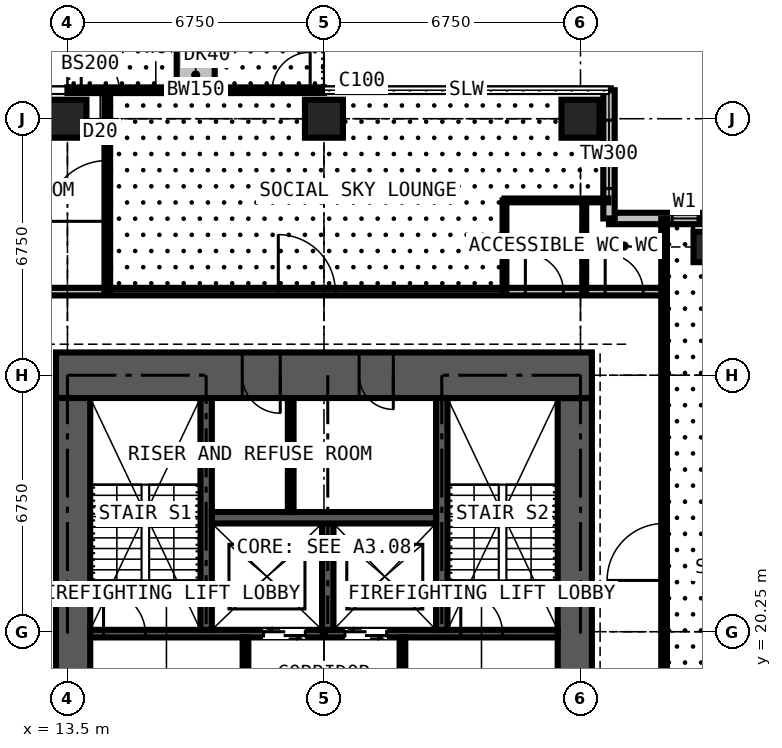
"""IFC4 building model, lengths in metres.
Left out: names, types, materials, properties, quantities, classifications, styles, units other than length and angle.
Written with IfcOpenShell. Run it as: python <this file> out.ifc"""

import sys

from ifc_helpers import new_model, si_unit, direction, frame, frame_2d, origin, origin_2d, place, context, subcontext, project, spatial, rectangle, extrude, element, fill, save


model = new_model("IFC4")
c1 = context("Model", 3, precision=1e-05, world=origin(), true_north=direction((0.0, 1.0)))
c2 = subcontext(c1, "Body", "Model", "MODEL_VIEW")
j1 = project(units=[si_unit("LENGTHUNIT", "METRE"), si_unit("PLANEANGLEUNIT", "RADIAN")], contexts=[c1])
p1 = place(None, origin())
s1 = spatial("IfcSite", under=j1, at=p1, CompositionType="ELEMENT")
p2 = place(p1, origin())
s2 = spatial("IfcBuilding", under=s1, at=p2, CompositionType="ELEMENT")
p3 = place(p2, frame((0.0, 0.0, 251.1)))
s3 = spatial("IfcBuildingStorey", under=s2, at=p3, CompositionType="ELEMENT", Elevation=251.1)
for number, where, z_axis, x_axis in (
    (1, (13.5, 33.75, 0.0), (0.0, 0.0, 1.0), (1.0, 0.0, 0.0)),
    (2, (20.25, 33.75, 0.0), (0.0, 0.0, 1.0), (1.0, 0.0, 0.0)),
    (3, (27.0, 33.75, 0.0), (0.0, 0.0, 1.0), (1.0, 0.0, 0.0)),
):
    element("IfcColumn", number, at=place(p3, frame(where, z_axis=z_axis, x_axis=x_axis)), inside=s3, PredefinedType="COLUMN", context=c2, shape_type="SweptSolid", body=[
        extrude(rectangle(XDim=1.0, YDim=1.0, at=origin_2d()), origin(), (0.0, 0.0, 1.0), 3.6),
    ])
p4 = place(p3, frame((30.375, 30.375, 0.0), z_axis=(0.0, 0.0, 1.0), x_axis=(1.0, 0.0, 0.0)))
e4 = element("IfcColumn", 4, at=p4, inside=s3, PredefinedType="COLUMN", context=c2, shape_type="SweptSolid", body=[
    extrude(rectangle(XDim=0.8, YDim=0.8, at=origin_2d()), origin(), (0.0, 0.0, 1.0), 3.6),
])
p5 = place(p3, frame((26.85, 14.1, 0.0), z_axis=(0.0, 0.0, 1.0), x_axis=(0.0, 1.0, 0.0)))
e5 = element("IfcWall", 5, at=p5, inside=s3, PredefinedType="SHEAR", context=c2, shape_type="SweptSolid", body=[
    extrude(rectangle(XDim=12.3, YDim=0.9, at=frame_2d((6.15, 0.0))), origin(), (0.0, 0.0, 1.0), 3.6),
])
p6 = place(p5, frame((3.65, 0.0, 0.0)))
e6 = element("IfcOpeningElement", 6, at=p6, cuts=e5, PredefinedType="OPENING", context=c2, shape_type="SweptSolid", body=[
    extrude(rectangle(XDim=1.2, YDim=2.2, at=frame_2d((0.6, 1.1))), frame((0.0, 0.46, 0.0), z_axis=(0.0, -1.0, 0.0), x_axis=(1.0, 0.0, 0.0)), (0.0, 0.0, 1.0), 0.92),
])
p7 = place(p3, frame((27.3, 27.0, 0.0), z_axis=(0.0, 0.0, 1.0), x_axis=(-1.0, 0.0, 0.0)))
e7 = element("IfcWall", 7, at=p7, inside=s3, PredefinedType="SHEAR", context=c2, shape_type="SweptSolid", body=[
    extrude(rectangle(XDim=14.1, YDim=1.2, at=frame_2d((7.05, 0.0))), origin(), (0.0, 0.0, 1.0), 3.6),
])
p8 = place(p7, frame((5.225, 0.0, 0.0)))
e8 = element("IfcOpeningElement", 8, at=p8, cuts=e7, PredefinedType="OPENING", context=c2, shape_type="SweptSolid", body=[
    extrude(rectangle(XDim=0.9, YDim=2.2, at=frame_2d((0.45, 1.1))), frame((0.0, 0.61, 0.0), z_axis=(0.0, -1.0, 0.0), x_axis=(1.0, 0.0, 0.0)), (0.0, 0.0, 1.0), 1.22),
])
p9 = place(p7, frame((8.2, 0.0, 0.0)))
e9 = element("IfcOpeningElement", 9, at=p9, cuts=e7, PredefinedType="OPENING", context=c2, shape_type="SweptSolid", body=[
    extrude(rectangle(XDim=1.0, YDim=2.2, at=frame_2d((0.5, 1.1))), frame((0.0, 0.61, 0.0), z_axis=(0.0, -1.0, 0.0), x_axis=(1.0, 0.0, 0.0)), (0.0, 0.0, 1.0), 1.22),
])
p10 = place(p3, frame((13.65, 26.4, 0.0), z_axis=(0.0, 0.0, 1.0), x_axis=(0.0, -1.0, 0.0)))
e10 = element("IfcWall", 10, at=p10, inside=s3, PredefinedType="SHEAR", context=c2, shape_type="SweptSolid", body=[
    extrude(rectangle(XDim=12.3, YDim=0.9, at=frame_2d((6.15, 0.0))), origin(), (0.0, 0.0, 1.0), 3.6),
])
p11 = place(p10, frame((7.45, 0.0, 0.0)))
e11 = element("IfcOpeningElement", 11, at=p11, cuts=e10, PredefinedType="OPENING", context=c2, shape_type="SweptSolid", body=[
    extrude(rectangle(XDim=1.2, YDim=2.2, at=frame_2d((0.6, 1.1))), frame((0.0, 0.46, 0.0), z_axis=(0.0, -1.0, 0.0), x_axis=(1.0, 0.0, 0.0)), (0.0, 0.0, 1.0), 0.92),
])
p12 = place(p3, frame((31.125, 31.125, 0.0), z_axis=(0.0, 0.0, 1.0), x_axis=(-1.0, 0.0, 0.0)))
e12 = element("IfcWall", 12, at=p12, inside=s3, PredefinedType="SOLIDWALL", context=c2, shape_type="SweptSolid", body=[
    extrude(rectangle(XDim=3.375, YDim=0.3, at=frame_2d((1.688, 0.0))), origin(), (0.0, 0.0, 1.0), 3.3),
])
p13 = place(p12, frame((0.212, 0.0, 0.9)))
e13 = element("IfcOpeningElement", 13, at=p13, cuts=e12, PredefinedType="OPENING", context=c2, shape_type="SweptSolid", body=[
    extrude(rectangle(XDim=1.5, YDim=1.8, at=frame_2d((0.75, 0.9))), frame((0.0, 0.16, 0.0), z_axis=(0.0, -1.0, 0.0), x_axis=(1.0, 0.0, 0.0)), (0.0, 0.0, 1.0), 0.32),
])
p14 = place(p3, frame((27.75, 31.125, 0.0), z_axis=(0.0, 0.0, 1.0), x_axis=(0.0, 1.0, 0.0)))
e14 = element("IfcWall", 14, at=p14, inside=s3, PredefinedType="SOLIDWALL", context=c2, shape_type="SweptSolid", body=[
    extrude(rectangle(XDim=3.375, YDim=0.3, at=frame_2d((1.688, 0.0))), origin(), (0.0, 0.0, 1.0), 3.3),
])
p15 = place(p14, frame((0.788, 0.0, 0.6)))
e15 = element("IfcOpeningElement", 15, at=p15, cuts=e14, PredefinedType="OPENING", context=c2, shape_type="SweptSolid", body=[
    extrude(rectangle(XDim=1.8, YDim=2.1, at=frame_2d((0.9, 1.05))), frame((0.0, 0.16, 0.0), z_axis=(0.0, -1.0, 0.0), x_axis=(1.0, 0.0, 0.0)), (0.0, 0.0, 1.0), 0.32),
])
p16 = place(p3, frame((13.5, 34.5, 0.0), z_axis=(0.0, 0.0, 1.0), x_axis=(1.0, 0.0, 0.0)))
e16 = element("IfcWall", 16, at=p16, inside=s3, PredefinedType="SOLIDWALL", context=c2, shape_type="SweptSolid", body=[
    extrude(rectangle(XDim=6.75, YDim=0.15, at=frame_2d((3.375, 0.0))), origin(), (0.0, 0.0, 1.0), 3.3),
])
p17 = place(p16, frame((0.363, 0.0, 0.0)))
e17 = element("IfcOpeningElement", 17, at=p17, cuts=e16, PredefinedType="OPENING", context=c2, shape_type="SweptSolid", body=[
    extrude(rectangle(XDim=1.0, YDim=2.2, at=frame_2d((0.5, 1.1))), frame((0.0, 0.085, 0.0), z_axis=(0.0, -1.0, 0.0), x_axis=(1.0, 0.0, 0.0)), (0.0, 0.0, 1.0), 0.17),
])
p18 = place(p16, frame((1.725, 0.0, 0.9)))
e18 = element("IfcOpeningElement", 18, at=p18, cuts=e16, PredefinedType="OPENING", context=c2, shape_type="SweptSolid", body=[
    extrude(rectangle(XDim=1.2, YDim=1.8, at=frame_2d((0.6, 0.9))), frame((0.0, 0.085, 0.0), z_axis=(0.0, -1.0, 0.0), x_axis=(1.0, 0.0, 0.0)), (0.0, 0.0, 1.0), 0.17),
])
p19 = place(p16, frame((5.387, 0.0, 0.0)))
e19 = element("IfcOpeningElement", 19, at=p19, cuts=e16, PredefinedType="OPENING", context=c2, shape_type="SweptSolid", body=[
    extrude(rectangle(XDim=1.0, YDim=2.2, at=frame_2d((0.5, 1.1))), frame((0.0, 0.085, 0.0), z_axis=(0.0, -1.0, 0.0), x_axis=(1.0, 0.0, 0.0)), (0.0, 0.0, 1.0), 0.17),
])
p20 = place(p16, frame((3.825, 0.0, 0.9)))
e20 = element("IfcOpeningElement", 20, at=p20, cuts=e16, PredefinedType="OPENING", context=c2, shape_type="SweptSolid", body=[
    extrude(rectangle(XDim=1.2, YDim=1.8, at=frame_2d((0.6, 0.9))), frame((0.0, 0.085, 0.0), z_axis=(0.0, -1.0, 0.0), x_axis=(1.0, 0.0, 0.0)), (0.0, 0.0, 1.0), 0.17),
])
p21 = place(p3, frame((16.875, 34.6, 0.0), z_axis=(0.0, 0.0, 1.0), x_axis=(0.0, 1.0, 0.0)))
e21 = element("IfcWall", 21, at=p21, inside=s3, PredefinedType="USERDEFINED", context=c2, shape_type="SweptSolid", body=[
    extrude(rectangle(XDim=2.2, YDim=1.0, at=frame_2d((1.1, 0.0))), origin(), (0.0, 0.0, 1.0), 0.9),
])
p22 = place(p3, frame((14.1, 20.2, 0.0), z_axis=(0.0, 0.0, 1.0), x_axis=(1.0, 0.0, 0.0)))
e22 = element("IfcWall", 22, at=p22, inside=s3, PredefinedType="SHEAR", context=c2, shape_type="SweptSolid", body=[
    extrude(rectangle(XDim=12.3, YDim=0.2, at=frame_2d((6.15, 0.0))), origin(), (0.0, 0.0, 1.0), 3.6),
])
p23 = place(p22, frame((4.56, 0.0, 0.0)))
e23 = element("IfcOpeningElement", 23, at=p23, cuts=e22, PredefinedType="OPENING", context=c2, shape_type="SweptSolid", body=[
    extrude(rectangle(XDim=1.1, YDim=2.2, at=frame_2d((0.55, 1.1))), frame((0.0, 0.11, 0.0), z_axis=(0.0, -1.0, 0.0), x_axis=(1.0, 0.0, 0.0)), (0.0, 0.0, 1.0), 0.22),
])
p24 = place(p22, frame((6.7, 0.0, 0.0)))
e24 = element("IfcOpeningElement", 24, at=p24, cuts=e22, PredefinedType="OPENING", context=c2, shape_type="SweptSolid", body=[
    extrude(rectangle(XDim=1.1, YDim=2.2, at=frame_2d((0.55, 1.1))), frame((0.0, 0.11, 0.0), z_axis=(0.0, -1.0, 0.0), x_axis=(1.0, 0.0, 0.0)), (0.0, 0.0, 1.0), 0.22),
])
p25 = place(p22, frame((0.35, 0.0, 0.0)))
e25 = element("IfcOpeningElement", 25, at=p25, cuts=e22, PredefinedType="OPENING", context=c2, shape_type="SweptSolid", body=[
    extrude(rectangle(XDim=1.1, YDim=2.2, at=frame_2d((0.55, 1.1))), frame((0.0, 0.11, 0.0), z_axis=(0.0, -1.0, 0.0), x_axis=(1.0, 0.0, 0.0)), (0.0, 0.0, 1.0), 0.22),
])
p26 = place(p22, frame((9.75, 0.0, 0.0)))
e26 = element("IfcOpeningElement", 26, at=p26, cuts=e22, PredefinedType="OPENING", context=c2, shape_type="SweptSolid", body=[
    extrude(rectangle(XDim=1.1, YDim=2.2, at=frame_2d((0.55, 1.1))), frame((0.0, 0.11, 0.0), z_axis=(0.0, -1.0, 0.0), x_axis=(1.0, 0.0, 0.0)), (0.0, 0.0, 1.0), 0.22),
])
for number, where, z_axis, x_axis in (
    (27, (17.15, 20.3, 0.0), (0.0, 0.0, 1.0), (0.0, 1.0, 0.0)),
    (28, (23.35, 20.3, 0.0), (0.0, 0.0, 1.0), (0.0, 1.0, 0.0)),
):
    element("IfcWall", number, at=place(p3, frame(where, z_axis=z_axis, x_axis=x_axis)), inside=s3, PredefinedType="SHEAR", context=c2, shape_type="SweptSolid", body=[
        extrude(rectangle(XDim=6.1, YDim=0.3, at=frame_2d((3.05, 0.0))), origin(), (0.0, 0.0, 1.0), 3.6),
    ])
p27 = place(p3, frame((20.35, 20.3, 0.0), z_axis=(0.0, 0.0, 1.0), x_axis=(0.0, 1.0, 0.0)))
e29 = element("IfcWall", 29, at=p27, inside=s3, PredefinedType="SHEAR", context=c2, shape_type="SweptSolid", body=[
    extrude(rectangle(XDim=2.8, YDim=0.3, at=frame_2d((1.4, 0.0))), origin(), (0.0, 0.0, 1.0), 3.6),
])
p28 = place(p3, frame((17.3, 23.25, 0.0), z_axis=(0.0, 0.0, 1.0), x_axis=(1.0, 0.0, 0.0)))
e30 = element("IfcWall", 30, at=p28, inside=s3, PredefinedType="SHEAR", context=c2, shape_type="SweptSolid", body=[
    extrude(rectangle(XDim=5.9, YDim=0.3, at=frame_2d((2.95, 0.0))), origin(), (0.0, 0.0, 1.0), 3.6),
])
p29 = place(p3, frame((18.185, 16.6, 0.0), z_axis=(0.0, 0.0, 1.0), x_axis=(0.0, 1.0, 0.0)))
e31 = element("IfcWall", 31, at=p29, inside=s3, PredefinedType="PARTITIONING", context=c2, shape_type="SweptSolid", body=[
    extrude(rectangle(XDim=3.5, YDim=0.15, at=frame_2d((1.75, 0.0))), origin(), (0.0, 0.0, 1.0), 3.3),
])
p30 = place(p29, frame((1.15, 0.0, 0.0)))
e32 = element("IfcOpeningElement", 32, at=p30, cuts=e31, PredefinedType="OPENING", context=c2, shape_type="SweptSolid", body=[
    extrude(rectangle(XDim=1.2, YDim=2.2, at=frame_2d((0.6, 1.1))), frame((0.0, 0.085, 0.0), z_axis=(0.0, -1.0, 0.0), x_axis=(1.0, 0.0, 0.0)), (0.0, 0.0, 1.0), 0.17),
])
p31 = place(p3, frame((22.315, 16.6, 0.0), z_axis=(0.0, 0.0, 1.0), x_axis=(0.0, 1.0, 0.0)))
e33 = element("IfcWall", 33, at=p31, inside=s3, PredefinedType="PARTITIONING", context=c2, shape_type="SweptSolid", body=[
    extrude(rectangle(XDim=3.5, YDim=0.15, at=frame_2d((1.75, 0.0))), origin(), (0.0, 0.0, 1.0), 3.3),
])
p32 = place(p31, frame((1.15, 0.0, 0.0)))
e34 = element("IfcOpeningElement", 34, at=p32, cuts=e33, PredefinedType="OPENING", context=c2, shape_type="SweptSolid", body=[
    extrude(rectangle(XDim=1.2, YDim=2.2, at=frame_2d((0.6, 1.1))), frame((0.0, 0.085, 0.0), z_axis=(0.0, -1.0, 0.0), x_axis=(1.0, 0.0, 0.0)), (0.0, 0.0, 1.0), 0.17),
])
p33 = place(p3, frame((19.375, 23.4, 0.0), z_axis=(0.0, 0.0, 1.0), x_axis=(0.0, 1.0, 0.0)))
e35 = element("IfcWall", 35, at=p33, inside=s3, PredefinedType="PARTITIONING", context=c2, shape_type="SweptSolid", body=[
    extrude(rectangle(XDim=3.0, YDim=0.15, at=frame_2d((1.5, 0.0))), origin(), (0.0, 0.0, 1.0), 3.3),
])
p34 = place(p3, frame((11.3, 29.2, 0.0), z_axis=(0.0, 0.0, 1.0), x_axis=(1.0, 0.0, 0.0)))
e36 = element("IfcWall", 36, at=p34, inside=s3, PredefinedType="PARTITIONING", context=c2, shape_type="SweptSolid", body=[
    extrude(rectangle(XDim=17.9, YDim=0.2, at=frame_2d((8.95, 0.0))), origin(), (0.0, 0.0, 1.0), 3.3),
])
p35 = place(p34, frame((14.25, 0.0, 0.0)))
e37 = element("IfcOpeningElement", 37, at=p35, cuts=e36, PredefinedType="OPENING", context=c2, shape_type="SweptSolid", body=[
    extrude(rectangle(XDim=1.0, YDim=2.2, at=frame_2d((0.5, 1.1))), frame((0.0, 0.11, 0.0), z_axis=(0.0, -1.0, 0.0), x_axis=(1.0, 0.0, 0.0)), (0.0, 0.0, 1.0), 0.22),
])
p36 = place(p34, frame((16.35, 0.0, 0.0)))
e38 = element("IfcOpeningElement", 38, at=p36, cuts=e36, PredefinedType="OPENING", context=c2, shape_type="SweptSolid", body=[
    extrude(rectangle(XDim=1.0, YDim=2.2, at=frame_2d((0.5, 1.1))), frame((0.0, 0.11, 0.0), z_axis=(0.0, -1.0, 0.0), x_axis=(1.0, 0.0, 0.0)), (0.0, 0.0, 1.0), 0.22),
])
p37 = place(p34, frame((7.749, 0.0, 0.0)))
e39 = element("IfcOpeningElement", 39, at=p37, cuts=e36, PredefinedType="OPENING", context=c2, shape_type="SweptSolid", body=[
    extrude(rectangle(XDim=1.5, YDim=2.2, at=frame_2d((0.75, 1.1))), frame((0.0, 0.11, 0.0), z_axis=(0.0, -1.0, 0.0), x_axis=(1.0, 0.0, 0.0)), (0.0, 0.0, 1.0), 0.22),
])
p38 = place(p3, frame((14.549, 29.2, 0.0), z_axis=(0.0, 0.0, 1.0), x_axis=(0.0, 1.0, 0.0)))
e40 = element("IfcWall", 40, at=p38, inside=s3, PredefinedType="PARTITIONING", context=c2, shape_type="SweptSolid", body=[
    extrude(rectangle(XDim=5.225, YDim=0.15, at=frame_2d((2.613, 0.0))), origin(), (0.0, 0.0, 1.0), 3.3),
])
p39 = place(p38, frame((1.85, 0.0, 0.0)))
e41 = element("IfcOpeningElement", 41, at=p39, cuts=e40, PredefinedType="OPENING", context=c2, shape_type="SweptSolid", body=[
    extrude(rectangle(XDim=1.6, YDim=2.4, at=frame_2d((0.8, 1.2))), frame((0.0, 0.085, 0.0), z_axis=(0.0, -1.0, 0.0), x_axis=(1.0, 0.0, 0.0)), (0.0, 0.0, 1.0), 0.17),
])
p40 = place(p3, frame((25.0, 29.2, 0.0), z_axis=(0.0, 0.0, 1.0), x_axis=(0.0, 1.0, 0.0)))
e42 = element("IfcWall", 42, at=p40, inside=s3, PredefinedType="PARTITIONING", context=c2, shape_type="SweptSolid", body=[
    extrude(rectangle(XDim=2.4, YDim=0.1, at=frame_2d((1.2, 0.0))), origin(), (0.0, 0.0, 1.0), 3.3),
])
p41 = place(p3, frame((25.0, 31.6, 0.0), z_axis=(0.0, 0.0, 1.0), x_axis=(1.0, 0.0, 0.0)))
e43 = element("IfcWall", 43, at=p41, inside=s3, PredefinedType="PARTITIONING", context=c2, shape_type="SweptSolid", body=[
    extrude(rectangle(XDim=2.734, YDim=0.1, at=frame_2d((1.367, 0.0))), origin(), (0.0, 0.0, 1.0), 3.3),
])
p42 = place(p3, frame((27.1, 29.2, 0.0), z_axis=(0.0, 0.0, 1.0), x_axis=(0.0, 1.0, 0.0)))
e44 = element("IfcWall", 44, at=p42, inside=s3, PredefinedType="PARTITIONING", context=c2, shape_type="SweptSolid", body=[
    extrude(rectangle(XDim=2.4, YDim=0.1, at=frame_2d((1.2, 0.0))), origin(), (0.0, 0.0, 1.0), 2.802),
])
p43 = place(p3, frame((29.2, 11.3, 0.0), z_axis=(0.0, 0.0, 1.0), x_axis=(0.0, 1.0, 0.0)))
e45 = element("IfcWall", 45, at=p43, inside=s3, PredefinedType="PARTITIONING", context=c2, shape_type="SweptSolid", body=[
    extrude(rectangle(XDim=19.809, YDim=0.15, at=frame_2d((9.904, 0.0))), origin(), (0.0, 0.0, 1.0), 3.3),
])
p44 = place(p43, frame((0.55, 0.0, 0.0)))
e46 = element("IfcOpeningElement", 46, at=p44, cuts=e45, PredefinedType="OPENING", context=c2, shape_type="SweptSolid", body=[
    extrude(rectangle(XDim=1.0, YDim=2.2, at=frame_2d((0.5, 1.1))), frame((0.0, 0.085, 0.0), z_axis=(0.0, -1.0, 0.0), x_axis=(1.0, 0.0, 0.0)), (0.0, 0.0, 1.0), 0.17),
])
p45 = place(p43, frame((2.65, 0.0, 0.0)))
e47 = element("IfcOpeningElement", 47, at=p45, cuts=e45, PredefinedType="OPENING", context=c2, shape_type="SweptSolid", body=[
    extrude(rectangle(XDim=1.0, YDim=2.2, at=frame_2d((0.5, 1.1))), frame((0.0, 0.085, 0.0), z_axis=(0.0, -1.0, 0.0), x_axis=(1.0, 0.0, 0.0)), (0.0, 0.0, 1.0), 0.17),
])
p46 = place(p43, frame((10.3, 0.0, 0.0)))
e48 = element("IfcOpeningElement", 48, at=p46, cuts=e45, PredefinedType="OPENING", context=c2, shape_type="SweptSolid", body=[
    extrude(rectangle(XDim=1.5, YDim=2.2, at=frame_2d((0.75, 1.1))), frame((0.0, 0.085, 0.0), z_axis=(0.0, -1.0, 0.0), x_axis=(1.0, 0.0, 0.0)), (0.0, 0.0, 1.0), 0.17),
])
p47 = place(p13, origin())
e49 = element("IfcWindow", 49, at=p47, inside=s3, PartitioningType="SINGLE_PANEL", PredefinedType="WINDOW", context=c2, shape_type="SweptSolid", body=[
    extrude(rectangle(XDim=1.5, YDim=1.8, at=frame_2d((0.75, 0.9))), frame((0.0, 0.03, 0.0), z_axis=(0.0, -1.0, 0.0), x_axis=(1.0, 0.0, 0.0)), (0.0, 0.0, 1.0), 0.06),
])
fill(e13, e49)
p48 = place(p15, origin())
e50 = element("IfcWindow", 50, at=p48, inside=s3, PartitioningType="SINGLE_PANEL", PredefinedType="WINDOW", context=c2, shape_type="SweptSolid", body=[
    extrude(rectangle(XDim=1.8, YDim=2.1, at=frame_2d((0.9, 1.05))), frame((0.0, 0.03, 0.0), z_axis=(0.0, -1.0, 0.0), x_axis=(1.0, 0.0, 0.0)), (0.0, 0.0, 1.0), 0.06),
])
fill(e15, e50)
p49 = place(p17, origin())
e51 = element("IfcDoor", 51, at=p49, inside=s3, OperationType="SINGLE_SWING_LEFT", PredefinedType="DOOR", context=c2, shape_type="SweptSolid", body=[
    extrude(rectangle(XDim=1.0, YDim=2.2, at=frame_2d((0.5, 1.1))), frame((0.0, 0.025, 0.0), z_axis=(0.0, -1.0, 0.0), x_axis=(1.0, 0.0, 0.0)), (0.0, 0.0, 1.0), 0.05),
])
fill(e17, e51)
p50 = place(p18, origin())
e52 = element("IfcWindow", 52, at=p50, inside=s3, PartitioningType="SINGLE_PANEL", PredefinedType="WINDOW", context=c2, shape_type="SweptSolid", body=[
    extrude(rectangle(XDim=1.2, YDim=1.8, at=frame_2d((0.6, 0.9))), frame((0.0, 0.03, 0.0), z_axis=(0.0, -1.0, 0.0), x_axis=(1.0, 0.0, 0.0)), (0.0, 0.0, 1.0), 0.06),
])
fill(e18, e52)
p51 = place(p19, origin())
e53 = element("IfcDoor", 53, at=p51, inside=s3, OperationType="SINGLE_SWING_RIGHT", PredefinedType="DOOR", context=c2, shape_type="SweptSolid", body=[
    extrude(rectangle(XDim=1.0, YDim=2.2, at=frame_2d((0.5, 1.1))), frame((0.0, 0.025, 0.0), z_axis=(0.0, -1.0, 0.0), x_axis=(1.0, 0.0, 0.0)), (0.0, 0.0, 1.0), 0.05),
])
fill(e19, e53)
p52 = place(p20, origin())
e54 = element("IfcWindow", 54, at=p52, inside=s3, PartitioningType="SINGLE_PANEL", PredefinedType="WINDOW", context=c2, shape_type="SweptSolid", body=[
    extrude(rectangle(XDim=1.2, YDim=1.8, at=frame_2d((0.6, 0.9))), frame((0.0, 0.03, 0.0), z_axis=(0.0, -1.0, 0.0), x_axis=(1.0, 0.0, 0.0)), (0.0, 0.0, 1.0), 0.06),
])
fill(e20, e54)
p53 = place(p23, origin())
e55 = element("IfcDoor", 55, at=p53, inside=s3, OperationType="DOUBLE_DOOR_SLIDING", PredefinedType="DOOR", context=c2, shape_type="SweptSolid", body=[
    extrude(rectangle(XDim=1.1, YDim=2.2, at=frame_2d((0.55, 1.1))), frame((0.0, 0.025, 0.0), z_axis=(0.0, -1.0, 0.0), x_axis=(1.0, 0.0, 0.0)), (0.0, 0.0, 1.0), 0.05),
])
fill(e23, e55)
p54 = place(p24, origin())
e56 = element("IfcDoor", 56, at=p54, inside=s3, OperationType="DOUBLE_DOOR_SLIDING", PredefinedType="DOOR", context=c2, shape_type="SweptSolid", body=[
    extrude(rectangle(XDim=1.1, YDim=2.2, at=frame_2d((0.55, 1.1))), frame((0.0, 0.025, 0.0), z_axis=(0.0, -1.0, 0.0), x_axis=(1.0, 0.0, 0.0)), (0.0, 0.0, 1.0), 0.05),
])
fill(e24, e56)
p55 = place(p8, origin())
e57 = element("IfcDoor", 57, at=p55, inside=s3, OperationType="SINGLE_SWING_LEFT", PredefinedType="DOOR", context=c2, shape_type="SweptSolid", body=[
    extrude(rectangle(XDim=0.9, YDim=2.2, at=frame_2d((0.45, 1.1))), frame((0.0, 0.4, 0.0), z_axis=(0.0, -1.0, 0.0), x_axis=(1.0, 0.0, 0.0)), (0.0, 0.0, 1.0), 0.8),
])
fill(e8, e57)
p56 = place(p9, origin())
e58 = element("IfcDoor", 58, at=p56, inside=s3, OperationType="SINGLE_SWING_LEFT", PredefinedType="DOOR", context=c2, shape_type="SweptSolid", body=[
    extrude(rectangle(XDim=1.0, YDim=2.2, at=frame_2d((0.5, 1.1))), frame((0.0, 0.025, 0.0), z_axis=(0.0, -1.0, 0.0), x_axis=(1.0, 0.0, 0.0)), (0.0, 0.0, 1.0), 0.05),
])
fill(e9, e58)
p57 = place(p25, origin())
e59 = element("IfcDoor", 59, at=p57, inside=s3, OperationType="SINGLE_SWING_LEFT", PredefinedType="DOOR", context=c2, shape_type="SweptSolid", body=[
    extrude(rectangle(XDim=1.1, YDim=2.2, at=frame_2d((0.55, 1.1))), frame((0.0, 0.025, 0.0), z_axis=(0.0, -1.0, 0.0), x_axis=(1.0, 0.0, 0.0)), (0.0, 0.0, 1.0), 0.05),
])
fill(e25, e59)
p58 = place(p26, origin())
e60 = element("IfcDoor", 60, at=p58, inside=s3, OperationType="SINGLE_SWING_LEFT", PredefinedType="DOOR", context=c2, shape_type="SweptSolid", body=[
    extrude(rectangle(XDim=1.1, YDim=2.2, at=frame_2d((0.55, 1.1))), frame((0.0, 0.025, 0.0), z_axis=(0.0, -1.0, 0.0), x_axis=(1.0, 0.0, 0.0)), (0.0, 0.0, 1.0), 0.05),
])
fill(e26, e60)
p59 = place(p46, origin())
e61 = element("IfcDoor", 61, at=p59, inside=s3, OperationType="DOUBLE_DOOR_SINGLE_SWING", PredefinedType="DOOR", context=c2, shape_type="SweptSolid", body=[
    extrude(rectangle(XDim=1.5, YDim=2.2, at=frame_2d((0.75, 1.1))), frame((0.0, 0.025, 0.0), z_axis=(0.0, -1.0, 0.0), x_axis=(1.0, 0.0, 0.0)), (0.0, 0.0, 1.0), 0.05),
])
fill(e48, e61)
p60 = place(p35, origin())
e62 = element("IfcDoor", 62, at=p60, inside=s3, OperationType="SINGLE_SWING_LEFT", PredefinedType="DOOR", context=c2, shape_type="SweptSolid", body=[
    extrude(rectangle(XDim=1.0, YDim=2.2, at=frame_2d((0.5, 1.1))), frame((0.0, 0.025, 0.0), z_axis=(0.0, -1.0, 0.0), x_axis=(1.0, 0.0, 0.0)), (0.0, 0.0, 1.0), 0.05),
])
fill(e37, e62)
p61 = place(p36, origin())
e63 = element("IfcDoor", 63, at=p61, inside=s3, OperationType="SINGLE_SWING_LEFT", PredefinedType="DOOR", context=c2, shape_type="SweptSolid", body=[
    extrude(rectangle(XDim=1.0, YDim=2.2, at=frame_2d((0.5, 1.1))), frame((0.0, 0.025, 0.0), z_axis=(0.0, -1.0, 0.0), x_axis=(1.0, 0.0, 0.0)), (0.0, 0.0, 1.0), 0.05),
])
fill(e38, e63)
p62 = place(p39, origin())
e64 = element("IfcDoor", 64, at=p62, inside=s3, OperationType="DOUBLE_DOOR_SINGLE_SWING", PredefinedType="DOOR", context=c2, shape_type="SweptSolid", body=[
    extrude(rectangle(XDim=1.6, YDim=2.4, at=frame_2d((0.8, 1.2))), frame((0.0, 0.025, 0.0), z_axis=(0.0, -1.0, 0.0), x_axis=(1.0, 0.0, 0.0)), (0.0, 0.0, 1.0), 0.05),
])
fill(e41, e64)
p63 = place(p37, origin())
e65 = element("IfcDoor", 65, at=p63, inside=s3, OperationType="DOUBLE_DOOR_SINGLE_SWING", PredefinedType="DOOR", context=c2, shape_type="SweptSolid", body=[
    extrude(rectangle(XDim=1.5, YDim=2.2, at=frame_2d((0.75, 1.1))), frame((0.0, 0.025, 0.0), z_axis=(0.0, -1.0, 0.0), x_axis=(1.0, 0.0, 0.0)), (0.0, 0.0, 1.0), 0.05),
])
fill(e39, e65)
save(model, sys.argv[1])
